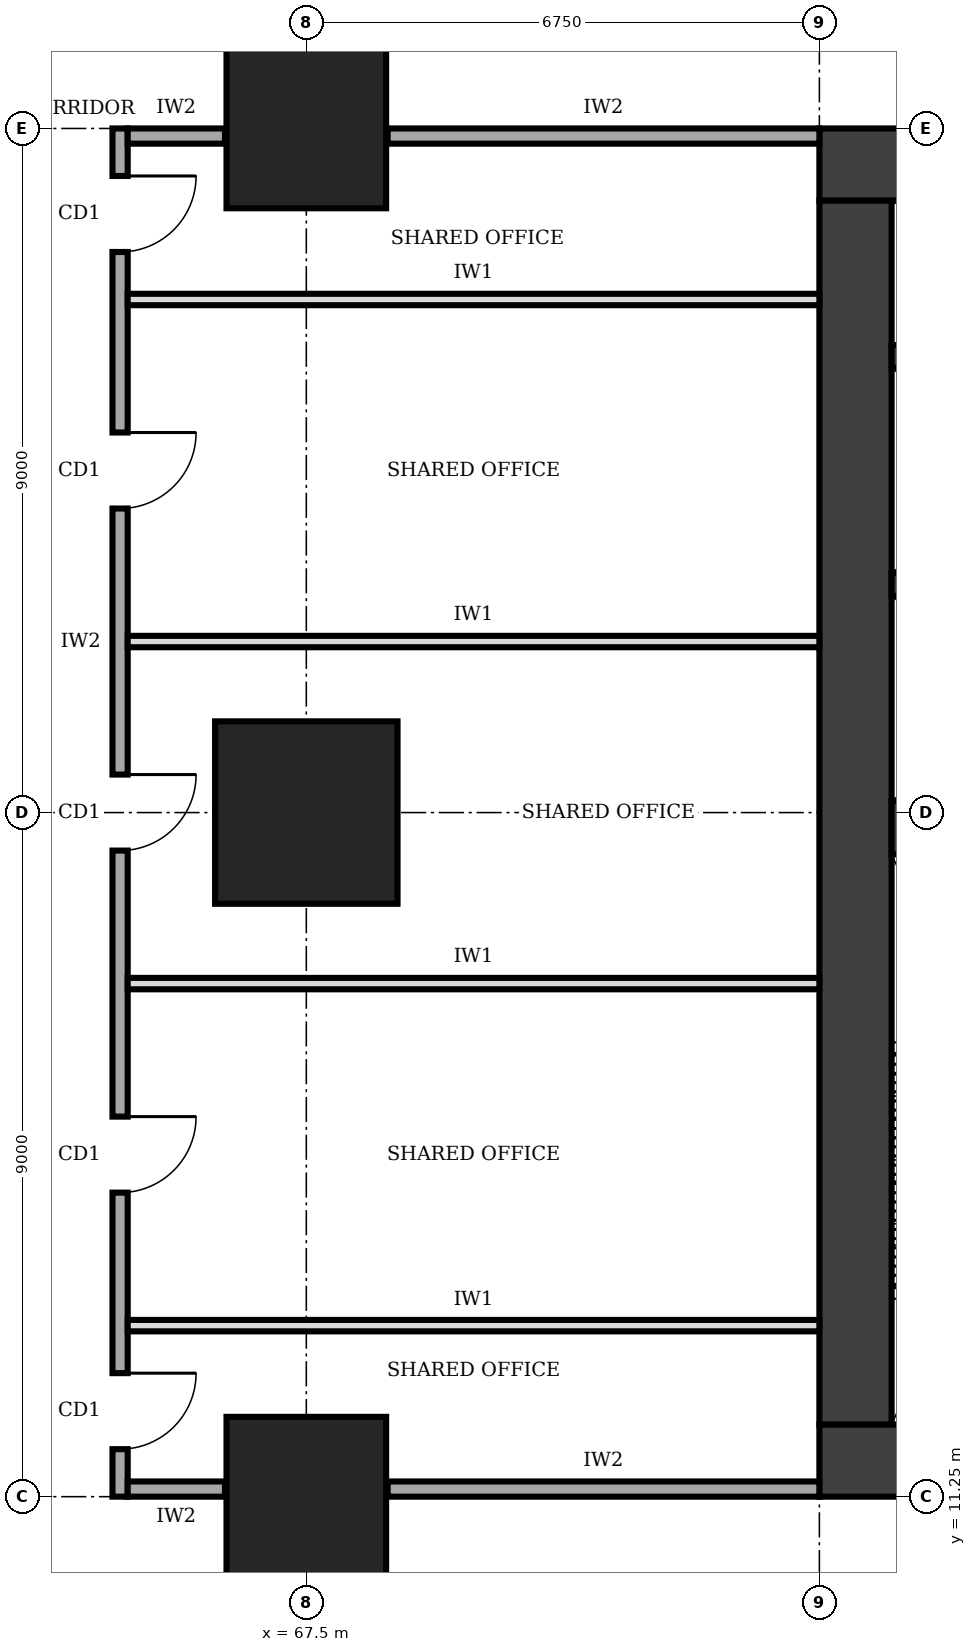
"""IFC4 building model, lengths in metres.
Left out: names, types, materials, properties, quantities, classifications, styles, units other than length and angle.
Written with IfcOpenShell. Run it as: python <this file> out.ifc"""

import sys

from ifc_helpers import new_model, si_unit, direction, frame, frame_2d, origin, origin_2d, place, context, subcontext, project, spatial, rectangle, extrude, element, fill, save


model = new_model("IFC4")
c1 = context("Model", 3, precision=1e-05, world=origin(), true_north=direction((0.0, 1.0)))
c2 = subcontext(c1, "Body", "Model", "MODEL_VIEW")
j1 = project(units=[si_unit("LENGTHUNIT", "METRE"), si_unit("PLANEANGLEUNIT", "RADIAN")], contexts=[c1])
p1 = place(None, origin())
s1 = spatial("IfcSite", under=j1, at=p1, CompositionType="ELEMENT")
p2 = place(p1, origin())
s2 = spatial("IfcBuilding", under=s1, at=p2, CompositionType="ELEMENT")
p3 = place(p2, frame((0.0, 0.0, 93.0)))
s3 = spatial("IfcBuildingStorey", under=s2, at=p3, CompositionType="ELEMENT", Elevation=93.0)
p4 = place(p3, frame((74.25, 11.725, 0.0), z_axis=(0.0, 0.0, 1.0), x_axis=(1.0, 0.0, 0.0)))
e1 = element("IfcWall", 1, at=p4, inside=s3, PredefinedType="SHEAR", context=c2, shape_type="SweptSolid", body=[
    extrude(rectangle(XDim=13.5, YDim=0.95, at=frame_2d((6.75, 0.0))), origin(), (0.0, 0.0, 1.0), 4.0),
])
p5 = place(p4, frame((4.75, 0.0, 0.0)))
e2 = element("IfcOpeningElement", 2, at=p5, cuts=e1, PredefinedType="OPENING", context=c2, shape_type="SweptSolid", body=[
    extrude(rectangle(XDim=1.0, YDim=2.1, at=frame_2d((0.5, 1.05))), frame((0.0, 0.485, 0.0), z_axis=(0.0, -1.0, 0.0), x_axis=(1.0, 0.0, 0.0)), (0.0, 0.0, 1.0), 0.97),
])
p6 = place(p3, frame((87.75, 28.775, 0.0), z_axis=(0.0, 0.0, 1.0), x_axis=(-1.0, 0.0, 0.0)))
e3 = element("IfcWall", 3, at=p6, inside=s3, PredefinedType="SHEAR", context=c2, shape_type="SweptSolid", body=[
    extrude(rectangle(XDim=13.5, YDim=0.95, at=frame_2d((6.75, 0.0))), origin(), (0.0, 0.0, 1.0), 4.0),
])
p7 = place(p6, frame((4.75, 0.0, 0.0)))
e4 = element("IfcOpeningElement", 4, at=p7, cuts=e3, PredefinedType="OPENING", context=c2, shape_type="SweptSolid", body=[
    extrude(rectangle(XDim=1.8, YDim=2.1, at=frame_2d((0.9, 1.05))), frame((0.0, 0.485, 0.0), z_axis=(0.0, -1.0, 0.0), x_axis=(1.0, 0.0, 0.0)), (0.0, 0.0, 1.0), 0.97),
])
p8 = place(p3, frame((74.725, 28.3, 0.0), z_axis=(0.0, 0.0, 1.0), x_axis=(0.0, -1.0, 0.0)))
e5 = element("IfcWall", 5, at=p8, inside=s3, PredefinedType="SHEAR", context=c2, shape_type="SweptSolid", body=[
    extrude(rectangle(XDim=16.1, YDim=0.95, at=frame_2d((8.05, 0.0))), origin(), (0.0, 0.0, 1.0), 4.0),
])
p9 = place(p3, frame((75.2, 20.05, 0.0), z_axis=(0.0, 0.0, 1.0), x_axis=(1.0, 0.0, 0.0)))
e6 = element("IfcWall", 6, at=p9, inside=s3, PredefinedType="SHEAR", context=c2, shape_type="SweptSolid", body=[
    extrude(rectangle(XDim=3.4, YDim=0.7, at=frame_2d((1.7, 0.0))), origin(), (0.0, 0.0, 1.0), 4.0),
])
for number, where, z_axis, x_axis in (
    (7, (75.2, 23.25, 0.0), (0.0, 0.0, 1.0), (1.0, 0.0, 0.0)),
    (8, (75.2, 26.25, 0.0), (0.0, 0.0, 1.0), (1.0, 0.0, 0.0)),
):
    element("IfcWall", number, at=place(p3, frame(where, z_axis=z_axis, x_axis=x_axis)), inside=s3, PredefinedType="SHEAR", context=c2, shape_type="SweptSolid", body=[
        extrude(rectangle(XDim=3.4, YDim=0.3, at=frame_2d((1.7, 0.0))), origin(), (0.0, 0.0, 1.0), 4.0),
    ])
p10 = place(p3, frame((67.5, 11.25, 0.0), z_axis=(0.0, 0.0, 1.0), x_axis=(1.0, 0.0, 0.0)))
e9 = element("IfcColumn", 9, at=p10, inside=s3, PredefinedType="COLUMN", context=c2, shape_type="SweptSolid", body=[
    extrude(rectangle(XDim=2.1, YDim=2.1, at=origin_2d()), origin(), (0.0, 0.0, 1.0), 4.0),
])
p11 = place(p3, frame((67.5, 20.25, 0.0), z_axis=(0.0, 0.0, 1.0), x_axis=(1.0, 0.0, 0.0)))
e10 = element("IfcColumn", 10, at=p11, inside=s3, PredefinedType="COLUMN", context=c2, shape_type="SweptSolid", body=[
    extrude(rectangle(XDim=2.4, YDim=2.4, at=origin_2d()), origin(), (0.0, 0.0, 1.0), 4.0),
])
p12 = place(p3, frame((67.5, 29.25, 0.0), z_axis=(0.0, 0.0, 1.0), x_axis=(1.0, 0.0, 0.0)))
e11 = element("IfcColumn", 11, at=p12, inside=s3, PredefinedType="COLUMN", context=c2, shape_type="SweptSolid", body=[
    extrude(rectangle(XDim=2.1, YDim=2.1, at=origin_2d()), origin(), (0.0, 0.0, 1.0), 4.0),
])
p13 = place(p3, frame((65.05, 29.25, 0.0), z_axis=(0.0, 0.0, 1.0), x_axis=(0.0, -1.0, 0.0)))
e12 = element("IfcWall", 12, at=p13, inside=s3, PredefinedType="SOLIDWALL", context=c2, shape_type="SweptSolid", body=[
    extrude(rectangle(XDim=18.0, YDim=0.2, at=frame_2d((9.0, 0.0))), origin(), (0.0, 0.0, 1.0), 3.75),
])
p14 = place(p13, frame((16.375, 0.0, 0.0)))
e13 = element("IfcOpeningElement", 13, at=p14, cuts=e12, PredefinedType="OPENING", context=c2, shape_type="SweptSolid", body=[
    extrude(rectangle(XDim=1.0, YDim=2.1, at=frame_2d((0.5, 1.05))), frame((0.0, 0.11, 0.0), z_axis=(0.0, -1.0, 0.0), x_axis=(1.0, 0.0, 0.0)), (0.0, 0.0, 1.0), 0.22),
])
p15 = place(p13, frame((13.0, 0.0, 0.0)))
e14 = element("IfcOpeningElement", 14, at=p15, cuts=e12, PredefinedType="OPENING", context=c2, shape_type="SweptSolid", body=[
    extrude(rectangle(XDim=1.0, YDim=2.1, at=frame_2d((0.5, 1.05))), frame((0.0, 0.11, 0.0), z_axis=(0.0, -1.0, 0.0), x_axis=(1.0, 0.0, 0.0)), (0.0, 0.0, 1.0), 0.22),
])
p16 = place(p13, frame((8.5, 0.0, 0.0)))
e15 = element("IfcOpeningElement", 15, at=p16, cuts=e12, PredefinedType="OPENING", context=c2, shape_type="SweptSolid", body=[
    extrude(rectangle(XDim=1.0, YDim=2.1, at=frame_2d((0.5, 1.05))), frame((0.0, 0.11, 0.0), z_axis=(0.0, -1.0, 0.0), x_axis=(1.0, 0.0, 0.0)), (0.0, 0.0, 1.0), 0.22),
])
p17 = place(p13, frame((4.0, 0.0, 0.0)))
e16 = element("IfcOpeningElement", 16, at=p17, cuts=e12, PredefinedType="OPENING", context=c2, shape_type="SweptSolid", body=[
    extrude(rectangle(XDim=1.0, YDim=2.1, at=frame_2d((0.5, 1.05))), frame((0.0, 0.11, 0.0), z_axis=(0.0, -1.0, 0.0), x_axis=(1.0, 0.0, 0.0)), (0.0, 0.0, 1.0), 0.22),
])
p18 = place(p13, frame((0.625, 0.0, 0.0)))
e17 = element("IfcOpeningElement", 17, at=p18, cuts=e12, PredefinedType="OPENING", context=c2, shape_type="SweptSolid", body=[
    extrude(rectangle(XDim=1.0, YDim=2.1, at=frame_2d((0.5, 1.05))), frame((0.0, 0.11, 0.0), z_axis=(0.0, -1.0, 0.0), x_axis=(1.0, 0.0, 0.0)), (0.0, 0.0, 1.0), 0.22),
])
p19 = place(p3, frame((65.15, 11.35, 0.0), z_axis=(0.0, 0.0, 1.0), x_axis=(1.0, 0.0, 0.0)))
e18 = element("IfcWall", 18, at=p19, inside=s3, PredefinedType="SOLIDWALL", context=c2, shape_type="SweptSolid", body=[
    extrude(rectangle(XDim=1.28, YDim=0.2, at=frame_2d((0.64, 0.0))), origin(), (0.0, 0.0, 1.0), 2.85),
])
p20 = place(p3, frame((68.57, 11.35, 0.0), z_axis=(0.0, 0.0, 1.0), x_axis=(1.0, 0.0, 0.0)))
e19 = element("IfcWall", 19, at=p20, inside=s3, PredefinedType="SOLIDWALL", context=c2, shape_type="SweptSolid", body=[
    extrude(rectangle(XDim=5.68, YDim=0.2, at=frame_2d((2.84, 0.0))), origin(), (0.0, 0.0, 1.0), 2.85),
])
p21 = place(p3, frame((65.15, 29.15, 0.0), z_axis=(0.0, 0.0, 1.0), x_axis=(1.0, 0.0, 0.0)))
e20 = element("IfcWall", 20, at=p21, inside=s3, PredefinedType="SOLIDWALL", context=c2, shape_type="SweptSolid", body=[
    extrude(rectangle(XDim=1.28, YDim=0.2, at=frame_2d((0.64, 0.0))), origin(), (0.0, 0.0, 1.0), 2.85),
])
p22 = place(p3, frame((68.57, 29.15, 0.0), z_axis=(0.0, 0.0, 1.0), x_axis=(1.0, 0.0, 0.0)))
e21 = element("IfcWall", 21, at=p22, inside=s3, PredefinedType="SOLIDWALL", context=c2, shape_type="SweptSolid", body=[
    extrude(rectangle(XDim=5.68, YDim=0.2, at=frame_2d((2.84, 0.0))), origin(), (0.0, 0.0, 1.0), 2.85),
])
for number, where, z_axis, x_axis in (
    (22, (65.15, 13.5, 0.0), (0.0, 0.0, 1.0), (1.0, 0.0, 0.0)),
    (23, (65.15, 18.0, 0.0), (0.0, 0.0, 1.0), (1.0, 0.0, 0.0)),
    (24, (65.15, 22.5, 0.0), (0.0, 0.0, 1.0), (1.0, 0.0, 0.0)),
    (25, (65.15, 27.0, 0.0), (0.0, 0.0, 1.0), (1.0, 0.0, 0.0)),
):
    element("IfcWall", number, at=place(p3, frame(where, z_axis=z_axis, x_axis=x_axis)), inside=s3, PredefinedType="PARTITIONING", context=c2, shape_type="SweptSolid", body=[
        extrude(rectangle(XDim=9.1, YDim=0.15, at=frame_2d((4.55, 0.0))), origin(), (0.0, 0.0, 1.0), 3.75),
    ])
p23 = place(p14, origin())
e26 = element("IfcDoor", 26, at=p23, inside=s3, OperationType="SINGLE_SWING_LEFT", PredefinedType="DOOR", context=c2, shape_type="SweptSolid", body=[
    extrude(rectangle(XDim=1.0, YDim=2.1, at=frame_2d((0.5, 1.05))), frame((0.0, 0.025, 0.0), z_axis=(0.0, -1.0, 0.0), x_axis=(1.0, 0.0, 0.0)), (0.0, 0.0, 1.0), 0.05),
])
fill(e13, e26)
p24 = place(p15, origin())
e27 = element("IfcDoor", 27, at=p24, inside=s3, OperationType="SINGLE_SWING_LEFT", PredefinedType="DOOR", context=c2, shape_type="SweptSolid", body=[
    extrude(rectangle(XDim=1.0, YDim=2.1, at=frame_2d((0.5, 1.05))), frame((0.0, 0.025, 0.0), z_axis=(0.0, -1.0, 0.0), x_axis=(1.0, 0.0, 0.0)), (0.0, 0.0, 1.0), 0.05),
])
fill(e14, e27)
p25 = place(p16, origin())
e28 = element("IfcDoor", 28, at=p25, inside=s3, OperationType="SINGLE_SWING_LEFT", PredefinedType="DOOR", context=c2, shape_type="SweptSolid", body=[
    extrude(rectangle(XDim=1.0, YDim=2.1, at=frame_2d((0.5, 1.05))), frame((0.0, 0.025, 0.0), z_axis=(0.0, -1.0, 0.0), x_axis=(1.0, 0.0, 0.0)), (0.0, 0.0, 1.0), 0.05),
])
fill(e15, e28)
p26 = place(p17, origin())
e29 = element("IfcDoor", 29, at=p26, inside=s3, OperationType="SINGLE_SWING_LEFT", PredefinedType="DOOR", context=c2, shape_type="SweptSolid", body=[
    extrude(rectangle(XDim=1.0, YDim=2.1, at=frame_2d((0.5, 1.05))), frame((0.0, 0.025, 0.0), z_axis=(0.0, -1.0, 0.0), x_axis=(1.0, 0.0, 0.0)), (0.0, 0.0, 1.0), 0.05),
])
fill(e16, e29)
p27 = place(p18, origin())
e30 = element("IfcDoor", 30, at=p27, inside=s3, OperationType="SINGLE_SWING_LEFT", PredefinedType="DOOR", context=c2, shape_type="SweptSolid", body=[
    extrude(rectangle(XDim=1.0, YDim=2.1, at=frame_2d((0.5, 1.05))), frame((0.0, 0.025, 0.0), z_axis=(0.0, -1.0, 0.0), x_axis=(1.0, 0.0, 0.0)), (0.0, 0.0, 1.0), 0.05),
])
fill(e17, e30)
save(model, sys.argv[1])
